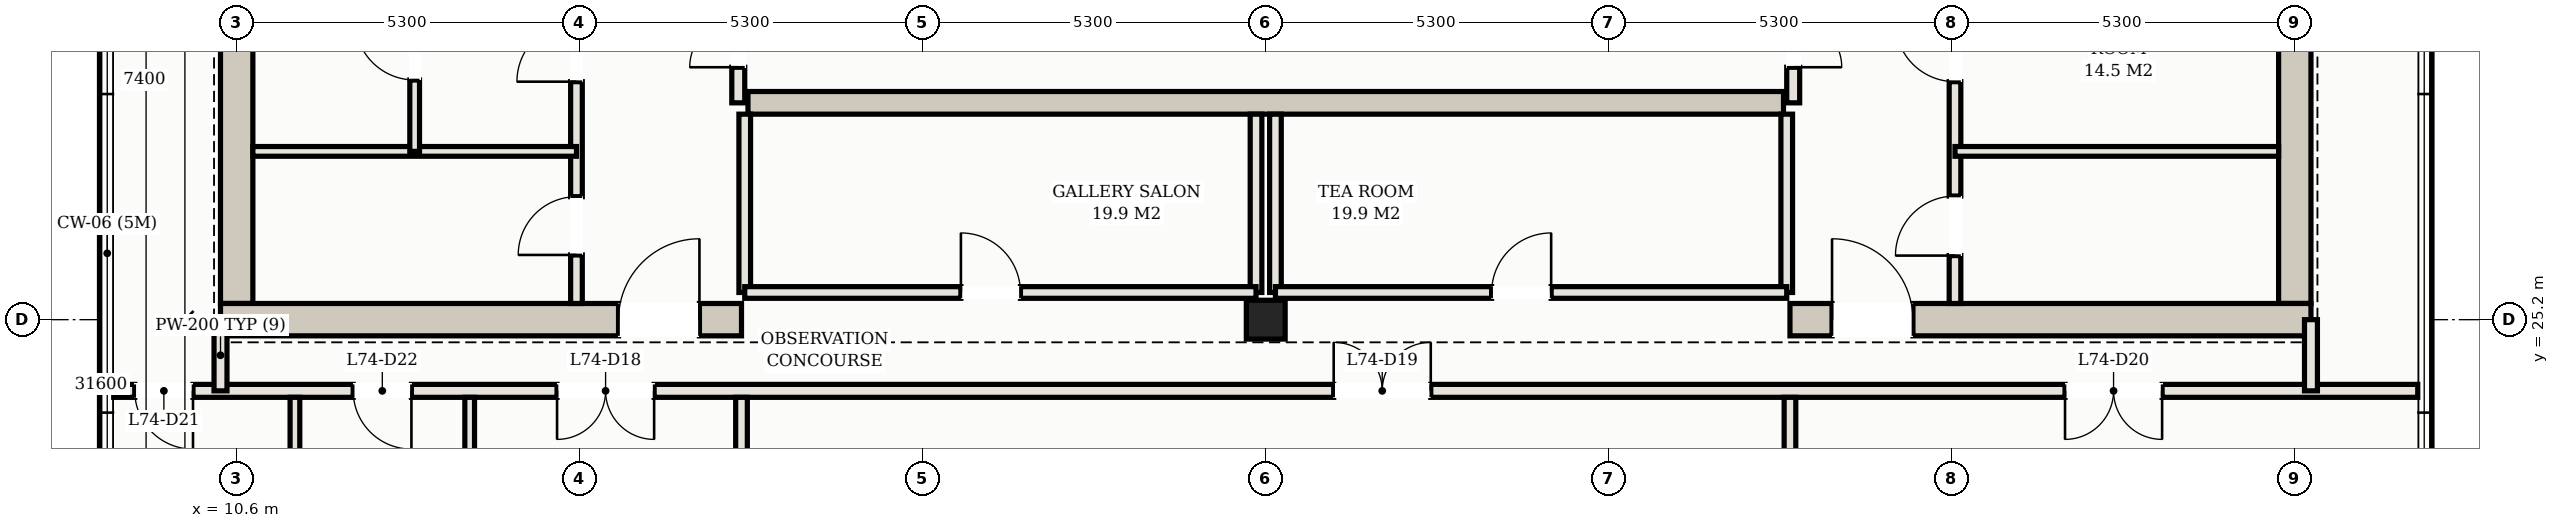
"""IFC4 building model, lengths in metres.
Left out: names, types, materials, properties, quantities, classifications, styles, units other than length and angle.
Written with IfcOpenShell. Run it as: python <this file> out.ifc"""

import sys

from ifc_helpers import new_model, si_unit, direction, frame, frame_2d, origin, origin_2d, place, context, subcontext, project, spatial, rectangle, hollow_rectangle, extrude, element, fill, save


model = new_model("IFC4")
c1 = context("Model", 3, precision=1e-05, world=origin(), true_north=direction((0.0, 1.0)))
c2 = subcontext(c1, "Body", "Model", "MODEL_VIEW")
j1 = project(units=[si_unit("LENGTHUNIT", "METRE"), si_unit("PLANEANGLEUNIT", "RADIAN")], contexts=[c1])
p1 = place(None, origin())
s1 = spatial("IfcSite", under=j1, at=p1, CompositionType="ELEMENT")
p2 = place(p1, origin())
s2 = spatial("IfcBuilding", under=s1, at=p2, CompositionType="ELEMENT")
p3 = place(p2, frame((0.0, 0.0, 266.0)))
s3 = spatial("IfcBuildingStorey", under=s2, at=p3, CompositionType="ELEMENT", Elevation=266.0)
for number, where, z_axis, x_axis in (
    (1, (10.6, 25.45, 0.0), (0.0, 0.0, 1.0), (0.0, 1.0, 0.0)),
    (2, (42.4, 25.45, 0.0), (0.0, 0.0, 1.0), (0.0, 1.0, 0.0)),
):
    element("IfcWall", number, at=place(p3, frame(where, z_axis=z_axis, x_axis=x_axis)), inside=s3, PredefinedType="SHEAR", context=c2, shape_type="SweptSolid", body=[
        extrude(rectangle(XDim=14.3, YDim=0.5, at=frame_2d((7.15, 0.0))), origin(), (0.0, 0.0, 1.0), 4.52),
    ])
p4 = place(p3, frame((10.35, 25.2, 0.0), z_axis=(0.0, 0.0, 1.0), x_axis=(1.0, 0.0, 0.0)))
e3 = element("IfcWall", 3, at=p4, inside=s3, PredefinedType="SHEAR", context=c2, shape_type="SweptSolid", body=[
    extrude(rectangle(XDim=8.05, YDim=0.5, at=frame_2d((4.025, 0.0))), origin(), (0.0, 0.0, 1.0), 4.52),
])
p5 = place(p4, frame((6.15, 0.0, 0.0)))
e4 = element("IfcOpeningElement", 4, at=p5, cuts=e3, PredefinedType="OPENING", context=c2, shape_type="SweptSolid", body=[
    extrude(rectangle(XDim=1.25, YDim=2.2, at=frame_2d((0.625, 1.1))), frame((0.0, 0.26, 0.0), z_axis=(0.0, -1.0, 0.0), x_axis=(1.0, 0.0, 0.0)), (0.0, 0.0, 1.0), 0.52),
])
p6 = place(p3, frame((34.6, 25.2, 0.0), z_axis=(0.0, 0.0, 1.0), x_axis=(1.0, 0.0, 0.0)))
e5 = element("IfcWall", 5, at=p6, inside=s3, PredefinedType="SHEAR", context=c2, shape_type="SweptSolid", body=[
    extrude(rectangle(XDim=8.05, YDim=0.5, at=frame_2d((4.025, 0.0))), origin(), (0.0, 0.0, 1.0), 4.52),
])
p7 = place(p6, frame((0.65, 0.0, 0.0)))
e6 = element("IfcOpeningElement", 6, at=p7, cuts=e5, PredefinedType="OPENING", context=c2, shape_type="SweptSolid", body=[
    extrude(rectangle(XDim=1.25, YDim=2.2, at=frame_2d((0.625, 1.1))), frame((0.0, 0.26, 0.0), z_axis=(0.0, -1.0, 0.0), x_axis=(1.0, 0.0, 0.0)), (0.0, 0.0, 1.0), 0.52),
])
p8 = place(p3, frame((18.5, 28.55, 0.0), z_axis=(0.0, 0.0, 1.0), x_axis=(1.0, 0.0, 0.0)))
e7 = element("IfcWall", 7, at=p8, inside=s3, PredefinedType="SHEAR", context=c2, shape_type="SweptSolid", body=[
    extrude(rectangle(XDim=16.0, YDim=0.35, at=frame_2d((8.0, 0.0))), origin(), (0.0, 0.0, 1.0), 4.52),
])
p9 = place(p3, frame((26.5, 25.2, 0.0), z_axis=(0.0, 0.0, 1.0), x_axis=(1.0, 0.0, 0.0)))
e8 = element("IfcColumn", 8, at=p9, inside=s3, PredefinedType="COLUMN", context=c2, shape_type="SweptSolid", body=[
    extrude(hollow_rectangle(XDim=0.6, YDim=0.6, WallThickness=0.022, at=origin_2d()), origin(), (0.0, 0.0, 1.0), 4.8),
])
p10 = place(p3, frame((15.85, 25.45, 0.0), z_axis=(0.0, 0.0, 1.0), x_axis=(0.0, 1.0, 0.0)))
e9 = element("IfcWall", 9, at=p10, inside=s3, PredefinedType="PARTITIONING", context=c2, shape_type="SweptSolid", body=[
    extrude(rectangle(XDim=5.475, YDim=0.18, at=frame_2d((2.738, 0.0))), origin(), (0.0, 0.0, 1.0), 3.865),
])
p11 = place(p10, frame((0.75, 0.0, 0.0)))
e10 = element("IfcOpeningElement", 10, at=p11, cuts=e9, PredefinedType="OPENING", context=c2, shape_type="SweptSolid", body=[
    extrude(rectangle(XDim=0.9, YDim=2.15, at=frame_2d((0.45, 1.075))), frame((0.0, 0.1, 0.0), z_axis=(0.0, -1.0, 0.0), x_axis=(1.0, 0.0, 0.0)), (0.0, 0.0, 1.0), 0.2),
])
p12 = place(p10, frame((3.427, 0.0, 0.0)))
e11 = element("IfcOpeningElement", 11, at=p12, cuts=e9, PredefinedType="OPENING", context=c2, shape_type="SweptSolid", body=[
    extrude(rectangle(XDim=0.92, YDim=2.15, at=frame_2d((0.46, 1.075))), frame((0.0, 0.1, 0.0), z_axis=(0.0, -1.0, 0.0), x_axis=(1.0, 0.0, 0.0)), (0.0, 0.0, 1.0), 0.2),
])
p13 = place(p3, frame((37.15, 25.45, 0.0), z_axis=(0.0, 0.0, 1.0), x_axis=(0.0, 1.0, 0.0)))
e12 = element("IfcWall", 12, at=p13, inside=s3, PredefinedType="PARTITIONING", context=c2, shape_type="SweptSolid", body=[
    extrude(rectangle(XDim=5.475, YDim=0.18, at=frame_2d((2.738, 0.0))), origin(), (0.0, 0.0, 1.0), 3.865),
])
p14 = place(p13, frame((0.74, 0.0, 0.0)))
e13 = element("IfcOpeningElement", 13, at=p14, cuts=e12, PredefinedType="OPENING", context=c2, shape_type="SweptSolid", body=[
    extrude(rectangle(XDim=0.92, YDim=2.15, at=frame_2d((0.46, 1.075))), frame((0.0, 0.1, 0.0), z_axis=(0.0, -1.0, 0.0), x_axis=(1.0, 0.0, 0.0)), (0.0, 0.0, 1.0), 0.2),
])
p15 = place(p13, frame((3.427, 0.0, 0.0)))
e14 = element("IfcOpeningElement", 14, at=p15, cuts=e12, PredefinedType="OPENING", context=c2, shape_type="SweptSolid", body=[
    extrude(rectangle(XDim=0.92, YDim=2.15, at=frame_2d((0.46, 1.075))), frame((0.0, 0.1, 0.0), z_axis=(0.0, -1.0, 0.0), x_axis=(1.0, 0.0, 0.0)), (0.0, 0.0, 1.0), 0.2),
])
p16 = place(p3, frame((10.85, 27.8, 0.0), z_axis=(0.0, 0.0, 1.0), x_axis=(1.0, 0.0, 0.0)))
e15 = element("IfcWall", 15, at=p16, inside=s3, PredefinedType="PARTITIONING", context=c2, shape_type="SweptSolid", body=[
    extrude(rectangle(XDim=5.0, YDim=0.15, at=frame_2d((2.5, 0.0))), origin(), (0.0, 0.0, 1.0), 4.52),
])
p17 = place(p3, frame((13.35, 27.8, 0.0), z_axis=(0.0, 0.0, 1.0), x_axis=(0.0, 1.0, 0.0)))
e16 = element("IfcWall", 16, at=p17, inside=s3, PredefinedType="PARTITIONING", context=c2, shape_type="SweptSolid", body=[
    extrude(rectangle(XDim=3.125, YDim=0.15, at=frame_2d((1.562, 0.0))), origin(), (0.0, 0.0, 1.0), 4.52),
])
p18 = place(p17, frame((1.103, 0.0, 0.0)))
e17 = element("IfcOpeningElement", 17, at=p18, cuts=e16, PredefinedType="OPENING", context=c2, shape_type="SweptSolid", body=[
    extrude(rectangle(XDim=0.92, YDim=2.15, at=frame_2d((0.46, 1.075))), frame((0.0, 0.085, 0.0), z_axis=(0.0, -1.0, 0.0), x_axis=(1.0, 0.0, 0.0)), (0.0, 0.0, 1.0), 0.17),
])
p19 = place(p3, frame((37.15, 27.8, 0.0), z_axis=(0.0, 0.0, 1.0), x_axis=(1.0, 0.0, 0.0)))
e18 = element("IfcWall", 18, at=p19, inside=s3, PredefinedType="PARTITIONING", context=c2, shape_type="SweptSolid", body=[
    extrude(rectangle(XDim=5.0, YDim=0.15, at=frame_2d((2.5, 0.0))), origin(), (0.0, 0.0, 1.0), 4.52),
])
p20 = place(p3, frame((18.35, 28.55, 0.0), z_axis=(0.0, 0.0, 1.0), x_axis=(0.0, 1.0, 0.0)))
e19 = element("IfcWall", 19, at=p20, inside=s3, PredefinedType="PARTITIONING", context=c2, shape_type="SweptSolid", body=[
    extrude(rectangle(XDim=2.6, YDim=0.2, at=frame_2d((1.3, 0.0))), origin(), (0.0, 0.0, 1.0), 4.52),
])
p21 = place(p20, frame((0.55, 0.0, 0.0)))
e20 = element("IfcOpeningElement", 20, at=p21, cuts=e19, PredefinedType="OPENING", context=c2, shape_type="SweptSolid", body=[
    extrude(rectangle(XDim=1.5, YDim=2.25, at=frame_2d((0.75, 1.125))), frame((0.0, 0.11, 0.0), z_axis=(0.0, -1.0, 0.0), x_axis=(1.0, 0.0, 0.0)), (0.0, 0.0, 1.0), 0.22),
])
p22 = place(p3, frame((34.65, 28.55, 0.0), z_axis=(0.0, 0.0, 1.0), x_axis=(0.0, 1.0, 0.0)))
e21 = element("IfcWall", 21, at=p22, inside=s3, PredefinedType="PARTITIONING", context=c2, shape_type="SweptSolid", body=[
    extrude(rectangle(XDim=2.6, YDim=0.2, at=frame_2d((1.3, 0.0))), origin(), (0.0, 0.0, 1.0), 4.52),
])
p23 = place(p22, frame((0.55, 0.0, 0.0)))
e22 = element("IfcOpeningElement", 22, at=p23, cuts=e21, PredefinedType="OPENING", context=c2, shape_type="SweptSolid", body=[
    extrude(rectangle(XDim=1.5, YDim=2.25, at=frame_2d((0.75, 1.125))), frame((0.0, 0.11, 0.0), z_axis=(0.0, -1.0, 0.0), x_axis=(1.0, 0.0, 0.0)), (0.0, 0.0, 1.0), 0.22),
])
for number, where, z_axis, x_axis in (
    (23, (18.45, 25.62, 0.0), (0.0, 0.0, 1.0), (0.0, 1.0, 0.0)),
    (24, (26.35, 25.62, 0.0), (0.0, 0.0, 1.0), (0.0, 1.0, 0.0)),
):
    element("IfcWall", number, at=place(p3, frame(where, z_axis=z_axis, x_axis=x_axis)), inside=s3, PredefinedType="PARTITIONING", context=c2, shape_type="SweptSolid", body=[
        extrude(rectangle(XDim=2.755, YDim=0.18, at=frame_2d((1.377, 0.0))), origin(), (0.0, 0.0, 1.0), 4.52),
    ])
p24 = place(p3, frame((18.45, 25.62, 0.0), z_axis=(0.0, 0.0, 1.0), x_axis=(1.0, 0.0, 0.0)))
e25 = element("IfcWall", 25, at=p24, inside=s3, PredefinedType="PARTITIONING", context=c2, shape_type="SweptSolid", body=[
    extrude(rectangle(XDim=7.9, YDim=0.18, at=frame_2d((3.95, 0.0))), origin(), (0.0, 0.0, 1.0), 4.52),
])
p25 = place(p24, frame((3.34, 0.0, 0.0)))
e26 = element("IfcOpeningElement", 26, at=p25, cuts=e25, PredefinedType="OPENING", context=c2, shape_type="SweptSolid", body=[
    extrude(rectangle(XDim=0.92, YDim=2.15, at=frame_2d((0.46, 1.075))), frame((0.0, 0.1, 0.0), z_axis=(0.0, -1.0, 0.0), x_axis=(1.0, 0.0, 0.0)), (0.0, 0.0, 1.0), 0.2),
])
for number, where, z_axis, x_axis in (
    (27, (26.65, 25.62, 0.0), (0.0, 0.0, 1.0), (0.0, 1.0, 0.0)),
    (28, (34.55, 25.62, 0.0), (0.0, 0.0, 1.0), (0.0, 1.0, 0.0)),
):
    element("IfcWall", number, at=place(p3, frame(where, z_axis=z_axis, x_axis=x_axis)), inside=s3, PredefinedType="PARTITIONING", context=c2, shape_type="SweptSolid", body=[
        extrude(rectangle(XDim=2.755, YDim=0.18, at=frame_2d((1.377, 0.0))), origin(), (0.0, 0.0, 1.0), 4.52),
    ])
p26 = place(p3, frame((26.65, 25.62, 0.0), z_axis=(0.0, 0.0, 1.0), x_axis=(1.0, 0.0, 0.0)))
e29 = element("IfcWall", 29, at=p26, inside=s3, PredefinedType="PARTITIONING", context=c2, shape_type="SweptSolid", body=[
    extrude(rectangle(XDim=7.9, YDim=0.18, at=frame_2d((3.95, 0.0))), origin(), (0.0, 0.0, 1.0), 4.52),
])
p27 = place(p26, frame((3.34, 0.0, 0.0)))
e30 = element("IfcOpeningElement", 30, at=p27, cuts=e29, PredefinedType="OPENING", context=c2, shape_type="SweptSolid", body=[
    extrude(rectangle(XDim=0.92, YDim=2.15, at=frame_2d((0.46, 1.075))), frame((0.0, 0.1, 0.0), z_axis=(0.0, -1.0, 0.0), x_axis=(1.0, 0.0, 0.0)), (0.0, 0.0, 1.0), 0.2),
])
p28 = place(p3, frame((8.7, 24.1, 0.0), z_axis=(0.0, 0.0, 1.0), x_axis=(1.0, 0.0, 0.0)))
e31 = element("IfcWall", 31, at=p28, inside=s3, PredefinedType="PARTITIONING", context=c2, shape_type="SweptSolid", body=[
    extrude(rectangle(XDim=35.6, YDim=0.2, at=frame_2d((17.8, 0.0))), origin(), (0.0, 0.0, 1.0), 4.52),
])
p29 = place(p28, frame((6.85, 0.0, 0.0)))
e32 = element("IfcOpeningElement", 32, at=p29, cuts=e31, PredefinedType="OPENING", context=c2, shape_type="SweptSolid", body=[
    extrude(rectangle(XDim=1.5, YDim=2.25, at=frame_2d((0.75, 1.125))), frame((0.0, 0.11, 0.0), z_axis=(0.0, -1.0, 0.0), x_axis=(1.0, 0.0, 0.0)), (0.0, 0.0, 1.0), 0.22),
])
p30 = place(p28, frame((18.85, 0.0, 0.0)))
e33 = element("IfcOpeningElement", 33, at=p30, cuts=e31, PredefinedType="OPENING", context=c2, shape_type="SweptSolid", body=[
    extrude(rectangle(XDim=1.5, YDim=2.25, at=frame_2d((0.75, 1.125))), frame((0.0, 0.11, 0.0), z_axis=(0.0, -1.0, 0.0), x_axis=(1.0, 0.0, 0.0)), (0.0, 0.0, 1.0), 0.22),
])
p31 = place(p28, frame((30.15, 0.0, 0.0)))
e34 = element("IfcOpeningElement", 34, at=p31, cuts=e31, PredefinedType="OPENING", context=c2, shape_type="SweptSolid", body=[
    extrude(rectangle(XDim=1.5, YDim=2.25, at=frame_2d((0.75, 1.125))), frame((0.0, 0.11, 0.0), z_axis=(0.0, -1.0, 0.0), x_axis=(1.0, 0.0, 0.0)), (0.0, 0.0, 1.0), 0.22),
])
p32 = place(p28, frame((0.325, 0.0, 0.0)))
e35 = element("IfcOpeningElement", 35, at=p32, cuts=e31, PredefinedType="OPENING", context=c2, shape_type="SweptSolid", body=[
    extrude(rectangle(XDim=0.9, YDim=2.15, at=frame_2d((0.45, 1.075))), frame((0.0, 0.11, 0.0), z_axis=(0.0, -1.0, 0.0), x_axis=(1.0, 0.0, 0.0)), (0.0, 0.0, 1.0), 0.22),
])
p33 = place(p28, frame((3.7, 0.0, 0.0)))
e36 = element("IfcOpeningElement", 36, at=p33, cuts=e31, PredefinedType="OPENING", context=c2, shape_type="SweptSolid", body=[
    extrude(rectangle(XDim=0.9, YDim=2.15, at=frame_2d((0.45, 1.075))), frame((0.0, 0.11, 0.0), z_axis=(0.0, -1.0, 0.0), x_axis=(1.0, 0.0, 0.0)), (0.0, 0.0, 1.0), 0.22),
])
for number, where, z_axis, x_axis in (
    (37, (18.4, 14.02, 0.0), (0.0, 0.0, 1.0), (0.0, 1.0, 0.0)),
    (38, (34.6, 14.02, 0.0), (0.0, 0.0, 1.0), (0.0, 1.0, 0.0)),
):
    element("IfcWall", number, at=place(p3, frame(where, z_axis=z_axis, x_axis=x_axis)), inside=s3, PredefinedType="PARTITIONING", context=c2, shape_type="SweptSolid", body=[
        extrude(rectangle(XDim=9.98, YDim=0.18, at=frame_2d((4.99, 0.0))), origin(), (0.0, 0.0, 1.0), 4.52),
    ])
for number, where, z_axis, x_axis in (
    (39, (10.35, 24.1, 0.0), (0.0, 0.0, 1.0), (0.0, 1.0, 0.0)),
    (40, (42.65, 24.1, 0.0), (0.0, 0.0, 1.0), (0.0, 1.0, 0.0)),
):
    element("IfcWall", number, at=place(p3, frame(where, z_axis=z_axis, x_axis=x_axis)), inside=s3, PredefinedType="PARTITIONING", context=c2, shape_type="SweptSolid", body=[
        extrude(rectangle(XDim=1.1, YDim=0.2, at=frame_2d((0.55, 0.0))), origin(), (0.0, 0.0, 1.0), 3.865),
    ])
for number, where, z_axis, x_axis in (
    (41, (14.2, 19.6, 0.0), (0.0, 0.0, 1.0), (0.0, 1.0, 0.0)),
    (42, (11.5, 19.6, 0.0), (0.0, 0.0, 1.0), (0.0, 1.0, 0.0)),
):
    element("IfcWall", number, at=place(p3, frame(where, z_axis=z_axis, x_axis=x_axis)), inside=s3, PredefinedType="PARTITIONING", context=c2, shape_type="SweptSolid", body=[
        extrude(rectangle(XDim=4.4, YDim=0.15, at=frame_2d((2.2, 0.0))), origin(), (0.0, 0.0, 1.0), 4.52),
    ])
p34 = place(p5, origin())
e43 = element("IfcDoor", 43, at=p34, inside=s3, OperationType="SINGLE_SWING_RIGHT", PredefinedType="DOOR", context=c2, shape_type="SweptSolid", body=[
    extrude(rectangle(XDim=1.25, YDim=2.2, at=frame_2d((0.625, 1.1))), frame((0.0, 0.025, 0.0), z_axis=(0.0, -1.0, 0.0), x_axis=(1.0, 0.0, 0.0)), (0.0, 0.0, 1.0), 0.05),
])
fill(e4, e43)
p35 = place(p7, origin())
e44 = element("IfcDoor", 44, at=p35, inside=s3, OperationType="SINGLE_SWING_LEFT", PredefinedType="DOOR", context=c2, shape_type="SweptSolid", body=[
    extrude(rectangle(XDim=1.25, YDim=2.2, at=frame_2d((0.625, 1.1))), frame((0.0, 0.025, 0.0), z_axis=(0.0, -1.0, 0.0), x_axis=(1.0, 0.0, 0.0)), (0.0, 0.0, 1.0), 0.05),
])
fill(e6, e44)
p36 = place(p11, origin())
e45 = element("IfcDoor", 45, at=p36, inside=s3, OperationType="SINGLE_SWING_LEFT", PredefinedType="DOOR", context=c2, shape_type="SweptSolid", body=[
    extrude(rectangle(XDim=0.9, YDim=2.15, at=frame_2d((0.45, 1.075))), frame((0.0, 0.025, 0.0), z_axis=(0.0, -1.0, 0.0), x_axis=(1.0, 0.0, 0.0)), (0.0, 0.0, 1.0), 0.05),
])
fill(e10, e45)
p37 = place(p12, origin())
e46 = element("IfcDoor", 46, at=p37, inside=s3, OperationType="SINGLE_SWING_LEFT", PredefinedType="DOOR", context=c2, shape_type="SweptSolid", body=[
    extrude(rectangle(XDim=0.92, YDim=2.15, at=frame_2d((0.46, 1.075))), frame((0.0, 0.025, 0.0), z_axis=(0.0, -1.0, 0.0), x_axis=(1.0, 0.0, 0.0)), (0.0, 0.0, 1.0), 0.05),
])
fill(e11, e46)
p38 = place(p18, origin())
e47 = element("IfcDoor", 47, at=p38, inside=s3, OperationType="SINGLE_SWING_RIGHT", PredefinedType="DOOR", context=c2, shape_type="SweptSolid", body=[
    extrude(rectangle(XDim=0.92, YDim=2.15, at=frame_2d((0.46, 1.075))), frame((0.0, 0.025, 0.0), z_axis=(0.0, -1.0, 0.0), x_axis=(1.0, 0.0, 0.0)), (0.0, 0.0, 1.0), 0.05),
])
fill(e17, e47)
p39 = place(p14, origin())
e48 = element("IfcDoor", 48, at=p39, inside=s3, OperationType="SINGLE_SWING_LEFT", PredefinedType="DOOR", context=c2, shape_type="SweptSolid", body=[
    extrude(rectangle(XDim=0.92, YDim=2.15, at=frame_2d((0.46, 1.075))), frame((0.0, 0.025, 0.0), z_axis=(0.0, -1.0, 0.0), x_axis=(1.0, 0.0, 0.0)), (0.0, 0.0, 1.0), 0.05),
])
fill(e13, e48)
p40 = place(p15, origin())
e49 = element("IfcDoor", 49, at=p40, inside=s3, OperationType="SINGLE_SWING_RIGHT", PredefinedType="DOOR", context=c2, shape_type="SweptSolid", body=[
    extrude(rectangle(XDim=0.92, YDim=2.15, at=frame_2d((0.46, 1.075))), frame((0.0, 0.025, 0.0), z_axis=(0.0, -1.0, 0.0), x_axis=(1.0, 0.0, 0.0)), (0.0, 0.0, 1.0), 0.05),
])
fill(e14, e49)
p41 = place(p21, origin())
e50 = element("IfcDoor", 50, at=p41, inside=s3, OperationType="DOUBLE_DOOR_SINGLE_SWING", PredefinedType="DOOR", context=c2, shape_type="SweptSolid", body=[
    extrude(rectangle(XDim=1.5, YDim=2.25, at=frame_2d((0.75, 1.125))), frame((0.0, 0.025, 0.0), z_axis=(0.0, -1.0, 0.0), x_axis=(1.0, 0.0, 0.0)), (0.0, 0.0, 1.0), 0.05),
])
fill(e20, e50)
p42 = place(p23, frame((1.5, 0.0, 0.0), z_axis=(0.0, 0.0, 1.0), x_axis=(-1.0, 0.0, 0.0)))
e51 = element("IfcDoor", 51, at=p42, inside=s3, OperationType="DOUBLE_DOOR_SINGLE_SWING", PredefinedType="DOOR", context=c2, shape_type="SweptSolid", body=[
    extrude(rectangle(XDim=1.5, YDim=2.25, at=frame_2d((0.75, 1.125))), frame((0.0, 0.025, 0.0), z_axis=(0.0, -1.0, 0.0), x_axis=(1.0, 0.0, 0.0)), (0.0, 0.0, 1.0), 0.05),
])
fill(e22, e51)
p43 = place(p25, origin())
e52 = element("IfcDoor", 52, at=p43, inside=s3, OperationType="SINGLE_SWING_LEFT", PredefinedType="DOOR", context=c2, shape_type="SweptSolid", body=[
    extrude(rectangle(XDim=0.92, YDim=2.15, at=frame_2d((0.46, 1.075))), frame((0.0, 0.025, 0.0), z_axis=(0.0, -1.0, 0.0), x_axis=(1.0, 0.0, 0.0)), (0.0, 0.0, 1.0), 0.05),
])
fill(e26, e52)
p44 = place(p27, origin())
e53 = element("IfcDoor", 53, at=p44, inside=s3, OperationType="SINGLE_SWING_RIGHT", PredefinedType="DOOR", context=c2, shape_type="SweptSolid", body=[
    extrude(rectangle(XDim=0.92, YDim=2.15, at=frame_2d((0.46, 1.075))), frame((0.0, 0.025, 0.0), z_axis=(0.0, -1.0, 0.0), x_axis=(1.0, 0.0, 0.0)), (0.0, 0.0, 1.0), 0.05),
])
fill(e30, e53)
p45 = place(p29, frame((1.5, 0.0, 0.0), z_axis=(0.0, 0.0, 1.0), x_axis=(-1.0, 0.0, 0.0)))
e54 = element("IfcDoor", 54, at=p45, inside=s3, OperationType="DOUBLE_DOOR_SINGLE_SWING", PredefinedType="DOOR", context=c2, shape_type="SweptSolid", body=[
    extrude(rectangle(XDim=1.5, YDim=2.25, at=frame_2d((0.75, 1.125))), frame((0.0, 0.025, 0.0), z_axis=(0.0, -1.0, 0.0), x_axis=(1.0, 0.0, 0.0)), (0.0, 0.0, 1.0), 0.05),
])
fill(e32, e54)
p46 = place(p30, origin())
e55 = element("IfcDoor", 55, at=p46, inside=s3, OperationType="DOUBLE_DOOR_SINGLE_SWING", PredefinedType="DOOR", context=c2, shape_type="SweptSolid", body=[
    extrude(rectangle(XDim=1.5, YDim=2.25, at=frame_2d((0.75, 1.125))), frame((0.0, 0.025, 0.0), z_axis=(0.0, -1.0, 0.0), x_axis=(1.0, 0.0, 0.0)), (0.0, 0.0, 1.0), 0.05),
])
fill(e33, e55)
p47 = place(p31, frame((1.5, 0.0, 0.0), z_axis=(0.0, 0.0, 1.0), x_axis=(-1.0, 0.0, 0.0)))
e56 = element("IfcDoor", 56, at=p47, inside=s3, OperationType="DOUBLE_DOOR_SINGLE_SWING", PredefinedType="DOOR", context=c2, shape_type="SweptSolid", body=[
    extrude(rectangle(XDim=1.5, YDim=2.25, at=frame_2d((0.75, 1.125))), frame((0.0, 0.025, 0.0), z_axis=(0.0, -1.0, 0.0), x_axis=(1.0, 0.0, 0.0)), (0.0, 0.0, 1.0), 0.05),
])
fill(e34, e56)
p48 = place(p32, frame((0.9, 0.0, 0.0), z_axis=(0.0, 0.0, 1.0), x_axis=(-1.0, 0.0, 0.0)))
e57 = element("IfcDoor", 57, at=p48, inside=s3, OperationType="SINGLE_SWING_LEFT", PredefinedType="DOOR", context=c2, shape_type="SweptSolid", body=[
    extrude(rectangle(XDim=0.9, YDim=2.15, at=frame_2d((0.45, 1.075))), frame((0.0, 0.025, 0.0), z_axis=(0.0, -1.0, 0.0), x_axis=(1.0, 0.0, 0.0)), (0.0, 0.0, 1.0), 0.05),
])
fill(e35, e57)
p49 = place(p33, frame((0.9, 0.0, 0.0), z_axis=(0.0, 0.0, 1.0), x_axis=(-1.0, 0.0, 0.0)))
e58 = element("IfcDoor", 58, at=p49, inside=s3, OperationType="SINGLE_SWING_LEFT", PredefinedType="DOOR", context=c2, shape_type="SweptSolid", body=[
    extrude(rectangle(XDim=0.9, YDim=2.15, at=frame_2d((0.45, 1.075))), frame((0.0, 0.025, 0.0), z_axis=(0.0, -1.0, 0.0), x_axis=(1.0, 0.0, 0.0)), (0.0, 0.0, 1.0), 0.05),
])
fill(e36, e58)
save(model, sys.argv[1])
